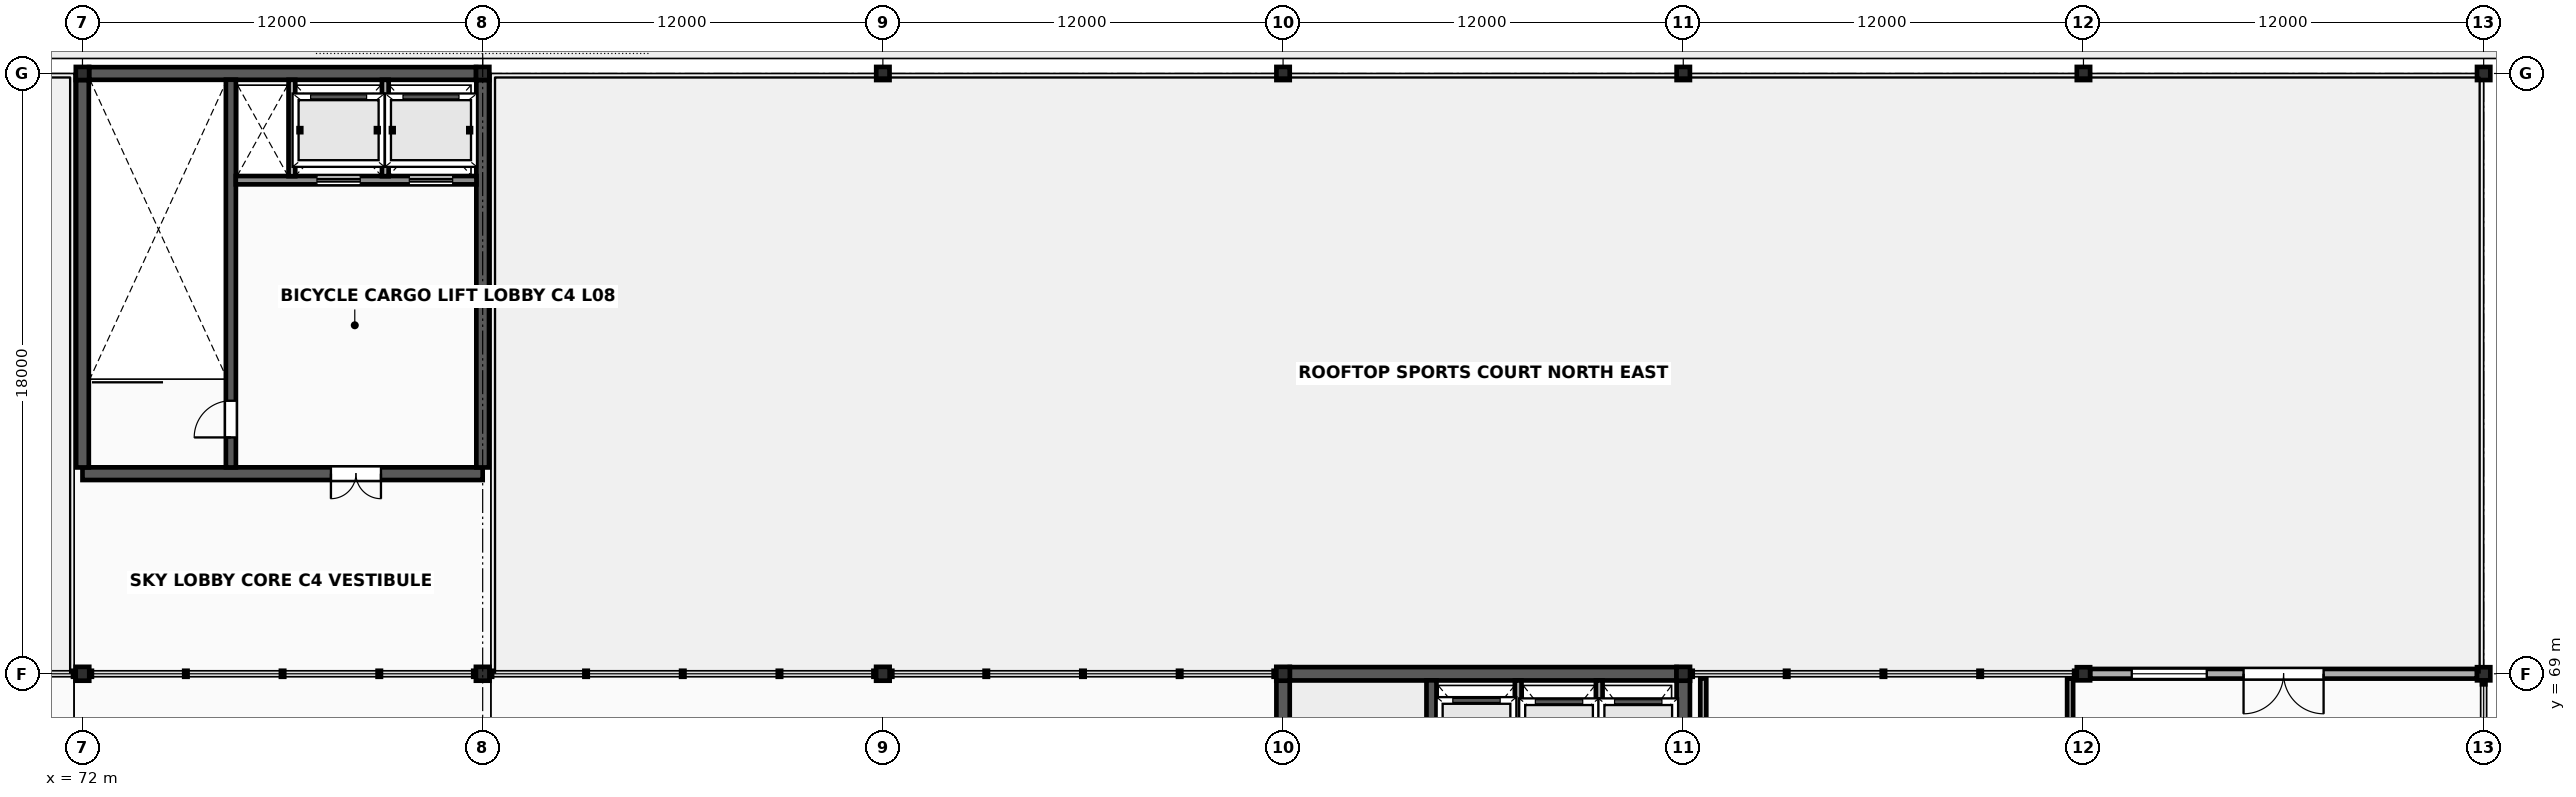
"""IFC4 building model, lengths in metres.
Left out: names, types, materials, properties, quantities, classifications, styles, units other than length and angle.
Written with IfcOpenShell. Run it as: python <this file> out.ifc"""

import sys

from ifc_helpers import new_model, si_unit, direction, frame, frame_2d, origin, origin_2d, place, context, subcontext, project, spatial, rectangle, i_section, extrude, element, fill, save


model = new_model("IFC4")
c1 = context("Model", 3, precision=1e-05, world=origin(), true_north=direction((0.0, 1.0)))
c2 = subcontext(c1, "Body", "Model", "MODEL_VIEW")
j1 = project(units=[si_unit("LENGTHUNIT", "METRE"), si_unit("PLANEANGLEUNIT", "RADIAN")], contexts=[c1])
p1 = place(None, origin())
s1 = spatial("IfcSite", under=j1, at=p1, CompositionType="ELEMENT")
p2 = place(p1, origin())
s2 = spatial("IfcBuilding", under=s1, at=p2, CompositionType="ELEMENT")
p3 = place(p2, frame((0.0, 0.0, 32.4)))
s3 = spatial("IfcBuildingStorey", under=s2, at=p3, CompositionType="ELEMENT", Elevation=32.4)
p4 = place(p3, frame((72.0, 69.0, 0.0), z_axis=(0.0, 0.0, 1.0), x_axis=(1.0, 0.0, 0.0)))
e1 = element("IfcColumn", 1, at=p4, inside=s3, PredefinedType="COLUMN", context=c2, shape_type="SweptSolid", body=[
    extrude(i_section(OverallWidth=0.406, OverallDepth=0.416, WebThickness=0.03, FlangeThickness=0.048, FilletRadius=0.018, at=origin_2d()), origin(), (0.0, 0.0, 1.0), 5.2),
])
p5 = place(p3, frame((72.0, 87.0, 0.0), z_axis=(0.0, 0.0, 1.0), x_axis=(1.0, 0.0, 0.0)))
e2 = element("IfcColumn", 2, at=p5, inside=s3, PredefinedType="COLUMN", context=c2, shape_type="SweptSolid", body=[
    extrude(i_section(OverallWidth=0.399, OverallDepth=0.393, WebThickness=0.023, FlangeThickness=0.037, FilletRadius=0.018, at=origin_2d()), origin(), (0.0, 0.0, 1.0), 5.2),
])
p6 = place(p3, frame((84.0, 69.0, 0.0), z_axis=(0.0, 0.0, 1.0), x_axis=(1.0, 0.0, 0.0)))
e3 = element("IfcColumn", 3, at=p6, inside=s3, PredefinedType="COLUMN", context=c2, shape_type="SweptSolid", body=[
    extrude(i_section(OverallWidth=0.406, OverallDepth=0.416, WebThickness=0.03, FlangeThickness=0.048, FilletRadius=0.018, at=origin_2d()), origin(), (0.0, 0.0, 1.0), 5.2),
])
p7 = place(p3, frame((84.0, 87.0, 0.0), z_axis=(0.0, 0.0, 1.0), x_axis=(1.0, 0.0, 0.0)))
e4 = element("IfcColumn", 4, at=p7, inside=s3, PredefinedType="COLUMN", context=c2, shape_type="SweptSolid", body=[
    extrude(i_section(OverallWidth=0.399, OverallDepth=0.393, WebThickness=0.023, FlangeThickness=0.037, FilletRadius=0.018, at=origin_2d()), origin(), (0.0, 0.0, 1.0), 5.2),
])
p8 = place(p3, frame((96.0, 69.0, 0.0), z_axis=(0.0, 0.0, 1.0), x_axis=(1.0, 0.0, 0.0)))
e5 = element("IfcColumn", 5, at=p8, inside=s3, PredefinedType="COLUMN", context=c2, shape_type="SweptSolid", body=[
    extrude(i_section(OverallWidth=0.406, OverallDepth=0.416, WebThickness=0.03, FlangeThickness=0.048, FilletRadius=0.018, at=origin_2d()), origin(), (0.0, 0.0, 1.0), 5.2),
])
p9 = place(p3, frame((96.0, 87.0, 0.0), z_axis=(0.0, 0.0, 1.0), x_axis=(1.0, 0.0, 0.0)))
e6 = element("IfcColumn", 6, at=p9, inside=s3, PredefinedType="COLUMN", context=c2, shape_type="SweptSolid", body=[
    extrude(i_section(OverallWidth=0.399, OverallDepth=0.393, WebThickness=0.023, FlangeThickness=0.037, FilletRadius=0.018, at=origin_2d()), origin(), (0.0, 0.0, 1.0), 5.2),
])
p10 = place(p3, frame((108.0, 69.0, 0.0), z_axis=(0.0, 0.0, 1.0), x_axis=(1.0, 0.0, 0.0)))
e7 = element("IfcColumn", 7, at=p10, inside=s3, PredefinedType="COLUMN", context=c2, shape_type="SweptSolid", body=[
    extrude(i_section(OverallWidth=0.406, OverallDepth=0.416, WebThickness=0.03, FlangeThickness=0.048, FilletRadius=0.018, at=origin_2d()), origin(), (0.0, 0.0, 1.0), 5.2),
])
p11 = place(p3, frame((108.0, 87.0, 0.0), z_axis=(0.0, 0.0, 1.0), x_axis=(1.0, 0.0, 0.0)))
e8 = element("IfcColumn", 8, at=p11, inside=s3, PredefinedType="COLUMN", context=c2, shape_type="SweptSolid", body=[
    extrude(i_section(OverallWidth=0.399, OverallDepth=0.393, WebThickness=0.023, FlangeThickness=0.037, FilletRadius=0.018, at=origin_2d()), origin(), (0.0, 0.0, 1.0), 5.2),
])
p12 = place(p3, frame((120.0, 69.0, 0.0), z_axis=(0.0, 0.0, 1.0), x_axis=(1.0, 0.0, 0.0)))
e9 = element("IfcColumn", 9, at=p12, inside=s3, PredefinedType="COLUMN", context=c2, shape_type="SweptSolid", body=[
    extrude(i_section(OverallWidth=0.406, OverallDepth=0.416, WebThickness=0.03, FlangeThickness=0.048, FilletRadius=0.018, at=origin_2d()), origin(), (0.0, 0.0, 1.0), 5.2),
])
for number, where, z_axis, x_axis in (
    (10, (120.0, 87.0, 0.0), (0.0, 0.0, 1.0), (1.0, 0.0, 0.0)),
    (11, (132.0, 69.0, 0.0), (0.0, 0.0, 1.0), (1.0, 0.0, 0.0)),
    (12, (132.0, 87.0, 0.0), (0.0, 0.0, 1.0), (1.0, 0.0, 0.0)),
    (13, (144.0, 69.0, 0.0), (0.0, 0.0, 1.0), (1.0, 0.0, 0.0)),
    (14, (144.0, 87.0, 0.0), (0.0, 0.0, 1.0), (1.0, 0.0, 0.0)),
):
    element("IfcColumn", number, at=place(p3, frame(where, z_axis=z_axis, x_axis=x_axis)), inside=s3, PredefinedType="COLUMN", context=c2, shape_type="SweptSolid", body=[
        extrude(i_section(OverallWidth=0.399, OverallDepth=0.393, WebThickness=0.023, FlangeThickness=0.037, FilletRadius=0.018, at=origin_2d()), origin(), (0.0, 0.0, 1.0), 5.2),
    ])
p13 = place(p3, frame((108.2, 69.0, 0.0), z_axis=(0.0, 0.0, 1.0), x_axis=(1.0, 0.0, 0.0)))
e15 = element("IfcWall", 15, at=p13, inside=s3, PredefinedType="SHEAR", context=c2, shape_type="SweptSolid", body=[
    extrude(rectangle(XDim=11.6, YDim=0.4, at=frame_2d((5.8, 0.0))), origin(), (0.0, 0.0, 1.0), 5.043),
])
for number, where, z_axis, x_axis in (
    (16, (108.0, 57.205, 0.0), (0.0, 0.0, 1.0), (0.0, 1.0, 0.0)),
    (17, (120.0, 57.205, 0.0), (0.0, 0.0, 1.0), (0.0, 1.0, 0.0)),
):
    element("IfcWall", number, at=place(p3, frame(where, z_axis=z_axis, x_axis=x_axis)), inside=s3, PredefinedType="SHEAR", context=c2, shape_type="SweptSolid", body=[
        extrude(rectangle(XDim=11.59, YDim=0.4, at=frame_2d((5.795, 0.0))), origin(), (0.0, 0.0, 1.0), 5.043),
    ])
p14 = place(p3, frame((112.45, 57.197, 0.0), z_axis=(0.0, 0.0, 1.0), x_axis=(0.0, 1.0, 0.0)))
e18 = element("IfcWall", 18, at=p14, inside=s3, PredefinedType="SHEAR", context=c2, shape_type="SweptSolid", body=[
    extrude(rectangle(XDim=11.606, YDim=0.3, at=frame_2d((5.803, 0.0))), origin(), (0.0, 0.0, 1.0), 5.043),
])
p15 = place(p14, frame((0.9, 0.0, 0.0)))
e19 = element("IfcOpeningElement", 19, at=p15, cuts=e18, PredefinedType="OPENING", context=c2, shape_type="SweptSolid", body=[
    extrude(rectangle(XDim=1.1, YDim=2.2, at=frame_2d((0.55, 1.1))), frame((0.0, 0.165, 0.0), z_axis=(0.0, -1.0, 0.0), x_axis=(1.0, 0.0, 0.0)), (0.0, 0.0, 1.0), 0.33),
])
for number, where, z_axis, x_axis in (
    (20, (115.05, 65.92, 0.0), (0.0, 0.0, 1.0), (0.0, 1.0, 0.0)),
    (21, (117.48, 65.92, 0.0), (0.0, 0.0, 1.0), (0.0, 1.0, 0.0)),
):
    element("IfcWall", number, at=place(p3, frame(where, z_axis=z_axis, x_axis=x_axis)), inside=s3, PredefinedType="SOLIDWALL", context=c2, shape_type="SweptSolid", body=[
        extrude(rectangle(XDim=2.88, YDim=0.2, at=frame_2d((1.44, 0.0))), origin(), (0.0, 0.0, 1.0), 5.033),
    ])
p16 = place(p3, frame((72.0, 75.0, 0.0), z_axis=(0.0, 0.0, 1.0), x_axis=(1.0, 0.0, 0.0)))
e22 = element("IfcWall", 22, at=p16, inside=s3, PredefinedType="SHEAR", context=c2, shape_type="SweptSolid", body=[
    extrude(rectangle(XDim=12.0, YDim=0.38, at=frame_2d((6.0, 0.0))), origin(), (0.0, 0.0, 1.0), 4.973),
])
p17 = place(p16, frame((7.45, 0.0, 0.0)))
e23 = element("IfcOpeningElement", 23, at=p17, cuts=e22, PredefinedType="OPENING", context=c2, shape_type="SweptSolid", body=[
    extrude(rectangle(XDim=1.5, YDim=2.25, at=frame_2d((0.75, 1.125))), frame((0.0, 0.205, 0.0), z_axis=(0.0, -1.0, 0.0), x_axis=(1.0, 0.0, 0.0)), (0.0, 0.0, 1.0), 0.41),
])
p18 = place(p3, frame((72.197, 87.0, 0.0), z_axis=(0.0, 0.0, 1.0), x_axis=(1.0, 0.0, 0.0)))
e24 = element("IfcWall", 24, at=p18, inside=s3, PredefinedType="SHEAR", context=c2, shape_type="SweptSolid", body=[
    extrude(rectangle(XDim=11.607, YDim=0.38, at=frame_2d((5.803, 0.0))), origin(), (0.0, 0.0, 1.0), 4.973),
])
for number, where, z_axis, x_axis in (
    (25, (72.0, 75.187, 0.0), (0.0, 0.0, 1.0), (0.0, 1.0, 0.0)),
    (26, (84.0, 75.187, 0.0), (0.0, 0.0, 1.0), (0.0, 1.0, 0.0)),
):
    element("IfcWall", number, at=place(p3, frame(where, z_axis=z_axis, x_axis=x_axis)), inside=s3, PredefinedType="SHEAR", context=c2, shape_type="SweptSolid", body=[
        extrude(rectangle(XDim=11.619, YDim=0.38, at=frame_2d((5.81, 0.0))), origin(), (0.0, 0.0, 1.0), 4.973),
    ])
p19 = place(p3, frame((76.45, 75.187, 0.0), z_axis=(0.0, 0.0, 1.0), x_axis=(0.0, 1.0, 0.0)))
e27 = element("IfcWall", 27, at=p19, inside=s3, PredefinedType="SHEAR", context=c2, shape_type="SweptSolid", body=[
    extrude(rectangle(XDim=11.626, YDim=0.3, at=frame_2d((5.813, 0.0))), origin(), (0.0, 0.0, 1.0), 4.973),
])
p20 = place(p19, frame((0.9, 0.0, 0.0)))
e28 = element("IfcOpeningElement", 28, at=p20, cuts=e27, PredefinedType="OPENING", context=c2, shape_type="SweptSolid", body=[
    extrude(rectangle(XDim=1.1, YDim=2.2, at=frame_2d((0.55, 1.1))), frame((0.0, 0.165, 0.0), z_axis=(0.0, -1.0, 0.0), x_axis=(1.0, 0.0, 0.0)), (0.0, 0.0, 1.0), 0.33),
])
p21 = place(p3, frame((76.597, 83.8, 0.0), z_axis=(0.0, 0.0, 1.0), x_axis=(1.0, 0.0, 0.0)))
e29 = element("IfcWall", 29, at=p21, inside=s3, PredefinedType="SOLIDWALL", context=c2, shape_type="SweptSolid", body=[
    extrude(rectangle(XDim=7.216, YDim=0.25, at=frame_2d((3.608, 0.0))), origin(), (0.0, 0.0, 1.0), 4.973),
])
p22 = place(p21, frame((2.433, 0.0, 0.0)))
e30 = element("IfcOpeningElement", 30, at=p22, cuts=e29, PredefinedType="OPENING", context=c2, shape_type="SweptSolid", body=[
    extrude(rectangle(XDim=1.3, YDim=2.28, at=frame_2d((0.65, 1.14))), frame((0.0, 0.14, 0.0), z_axis=(0.0, -1.0, 0.0), x_axis=(1.0, 0.0, 0.0)), (0.0, 0.0, 1.0), 0.28),
])
p23 = place(p21, frame((5.203, 0.0, 0.0)))
e31 = element("IfcOpeningElement", 31, at=p23, cuts=e29, PredefinedType="OPENING", context=c2, shape_type="SweptSolid", body=[
    extrude(rectangle(XDim=1.3, YDim=2.28, at=frame_2d((0.65, 1.14))), frame((0.0, 0.14, 0.0), z_axis=(0.0, -1.0, 0.0), x_axis=(1.0, 0.0, 0.0)), (0.0, 0.0, 1.0), 0.28),
])
for number, where, z_axis, x_axis in (
    (32, (78.28, 83.92, 0.0), (0.0, 0.0, 1.0), (0.0, 1.0, 0.0)),
    (33, (81.08, 83.92, 0.0), (0.0, 0.0, 1.0), (0.0, 1.0, 0.0)),
):
    element("IfcWall", number, at=place(p3, frame(where, z_axis=z_axis, x_axis=x_axis)), inside=s3, PredefinedType="SOLIDWALL", context=c2, shape_type="SweptSolid", body=[
        extrude(rectangle(XDim=2.89, YDim=0.2, at=frame_2d((1.445, 0.0))), origin(), (0.0, 0.0, 1.0), 4.963),
    ])
p24 = place(p3, frame((132.198, 69.0, 0.0), z_axis=(0.0, 0.0, 1.0), x_axis=(1.0, 0.0, 0.0)))
e34 = element("IfcWall", 34, at=p24, inside=s3, PredefinedType="SOLIDWALL", context=c2, shape_type="SweptSolid", body=[
    extrude(rectangle(XDim=11.605, YDim=0.29, at=frame_2d((5.802, 0.0))), origin(), (0.0, 0.0, 1.0), 4.1),
])
p25 = place(p24, frame((4.603, 0.0, 0.0)))
e35 = element("IfcOpeningElement", 35, at=p25, cuts=e34, PredefinedType="OPENING", context=c2, shape_type="SweptSolid", body=[
    extrude(rectangle(XDim=2.4, YDim=2.54, at=frame_2d((1.2, 1.27))), frame((0.0, 0.16, 0.0), z_axis=(0.0, -1.0, 0.0), x_axis=(1.0, 0.0, 0.0)), (0.0, 0.0, 1.0), 0.32),
])
p26 = place(p24, frame((1.25, 0.0, 1.95)))
e36 = element("IfcOpeningElement", 36, at=p26, cuts=e34, PredefinedType="OPENING", context=c2, shape_type="SweptSolid", body=[
    extrude(rectangle(XDim=2.25, YDim=0.88, at=frame_2d((1.125, 0.44))), frame((0.0, 0.16, 0.0), z_axis=(0.0, -1.0, 0.0), x_axis=(1.0, 0.0, 0.0)), (0.0, 0.0, 1.0), 0.32),
])
for number, where, z_axis, x_axis in (
    (37, (120.6, 57.36, 0.0), (0.0, 0.0, 1.0), (0.0, 1.0, 0.0)),
    (38, (131.6, 57.36, 0.0), (0.0, 0.0, 1.0), (0.0, 1.0, 0.0)),
):
    element("IfcWall", number, at=place(p3, frame(where, z_axis=z_axis, x_axis=x_axis)), inside=s3, PredefinedType="SOLIDWALL", context=c2, shape_type="SweptSolid", body=[
        extrude(rectangle(XDim=11.5, YDim=0.18, at=frame_2d((5.75, 0.0))), origin(), (0.0, 0.0, 1.0), 2.88),
    ])
p27 = place(p25, origin())
e39 = element("IfcDoor", 39, at=p27, inside=s3, OperationType="DOUBLE_DOOR_SINGLE_SWING", PredefinedType="DOOR", context=c2, shape_type="SweptSolid", body=[
    extrude(rectangle(XDim=2.4, YDim=2.54, at=frame_2d((1.2, 1.27))), frame((0.0, 0.025, 0.0), z_axis=(0.0, -1.0, 0.0), x_axis=(1.0, 0.0, 0.0)), (0.0, 0.0, 1.0), 0.05),
])
fill(e35, e39)
p28 = place(p26, origin())
e40 = element("IfcWindow", 40, at=p28, inside=s3, PartitioningType="DOUBLE_PANEL_VERTICAL", PredefinedType="USERDEFINED", context=c2, shape_type="SweptSolid", body=[
    extrude(rectangle(XDim=2.25, YDim=0.88, at=frame_2d((1.125, 0.44))), frame((0.0, 0.03, 0.0), z_axis=(0.0, -1.0, 0.0), x_axis=(1.0, 0.0, 0.0)), (0.0, 0.0, 1.0), 0.06),
])
fill(e36, e40)
p29 = place(p20, origin())
e41 = element("IfcDoor", 41, at=p29, inside=s3, OperationType="SINGLE_SWING_LEFT", PredefinedType="DOOR", context=c2, shape_type="SweptSolid", body=[
    extrude(rectangle(XDim=1.1, YDim=2.2, at=frame_2d((0.55, 1.1))), frame((0.0, 0.025, 0.0), z_axis=(0.0, -1.0, 0.0), x_axis=(1.0, 0.0, 0.0)), (0.0, 0.0, 1.0), 0.05),
])
fill(e28, e41)
p30 = place(p17, origin())
e42 = element("IfcDoor", 42, at=p30, inside=s3, OperationType="DOUBLE_DOOR_SINGLE_SWING", PredefinedType="DOOR", context=c2, shape_type="SweptSolid", body=[
    extrude(rectangle(XDim=1.5, YDim=2.25, at=frame_2d((0.75, 1.125))), frame((0.0, 0.025, 0.0), z_axis=(0.0, -1.0, 0.0), x_axis=(1.0, 0.0, 0.0)), (0.0, 0.0, 1.0), 0.05),
])
fill(e23, e42)
p31 = place(p22, origin())
e43 = element("IfcDoor", 43, at=p31, inside=s3, OperationType="SLIDING_TO_LEFT", PredefinedType="USERDEFINED", context=c2, shape_type="SweptSolid", body=[
    extrude(rectangle(XDim=1.3, YDim=2.28, at=frame_2d((0.65, 1.14))), frame((0.0, 0.025, 0.0), z_axis=(0.0, -1.0, 0.0), x_axis=(1.0, 0.0, 0.0)), (0.0, 0.0, 1.0), 0.05),
])
fill(e30, e43)
p32 = place(p23, origin())
e44 = element("IfcDoor", 44, at=p32, inside=s3, OperationType="SLIDING_TO_LEFT", PredefinedType="USERDEFINED", context=c2, shape_type="SweptSolid", body=[
    extrude(rectangle(XDim=1.3, YDim=2.28, at=frame_2d((0.65, 1.14))), frame((0.0, 0.025, 0.0), z_axis=(0.0, -1.0, 0.0), x_axis=(1.0, 0.0, 0.0)), (0.0, 0.0, 1.0), 0.05),
])
fill(e31, e44)
save(model, sys.argv[1])
